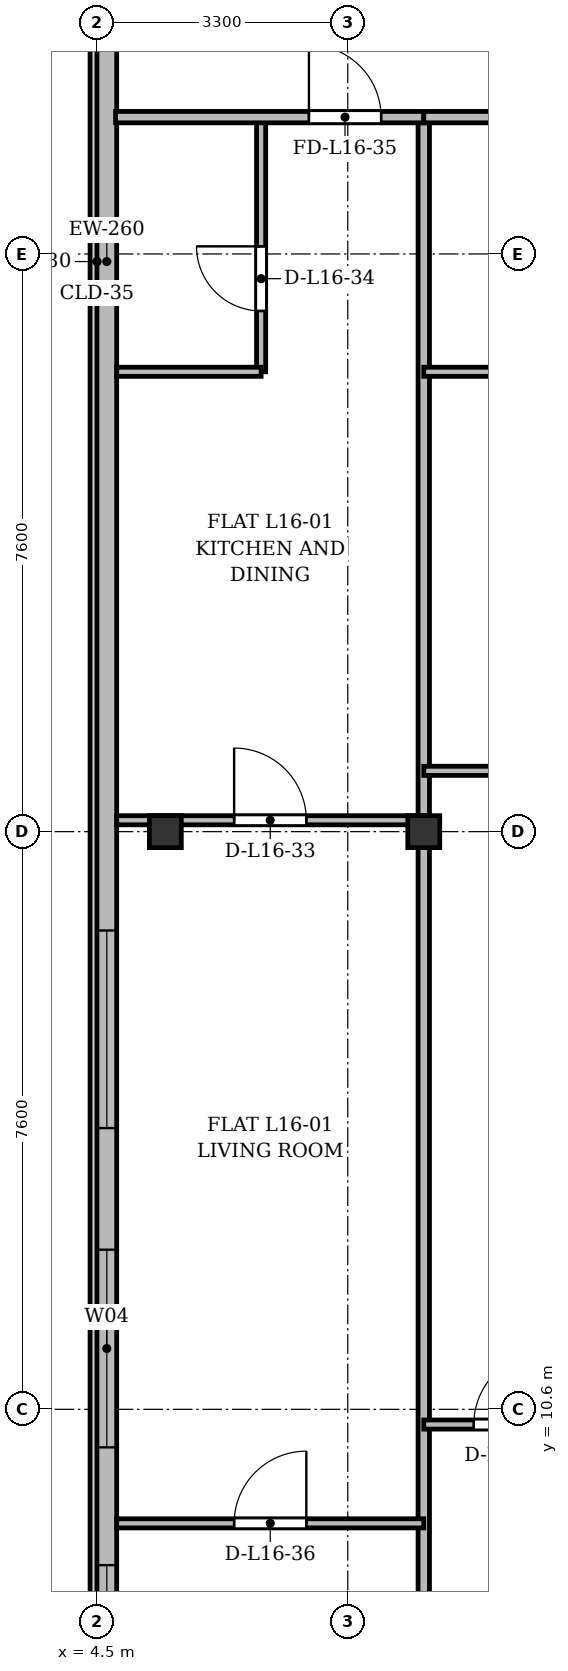
"""IFC4 building model, lengths in metres.
Left out: names, types, materials, properties, quantities, classifications, styles, units other than length and angle.
Written with IfcOpenShell. Run it as: python <this file> out.ifc"""

import sys

from ifc_helpers import new_model, si_unit, direction, frame, frame_2d, origin, origin_2d, place, context, subcontext, project, spatial, rectangle, i_section, extrude, source, transform, mapped, element, fill, save


model = new_model("IFC4")
c1 = context("Model", 3, precision=1e-05, world=origin(), true_north=direction((0.0, 1.0)))
c2 = subcontext(c1, "Body", "Model", "MODEL_VIEW")
j1 = project(units=[si_unit("LENGTHUNIT", "METRE"), si_unit("PLANEANGLEUNIT", "RADIAN")], contexts=[c1])
p1 = place(None, origin())
s1 = spatial("IfcSite", under=j1, at=p1, CompositionType="ELEMENT")
p2 = place(p1, origin())
s2 = spatial("IfcBuilding", under=s1, at=p2, CompositionType="ELEMENT")
p3 = place(p2, frame((0.0, 0.0, 63.1)))
s3 = spatial("IfcBuildingStorey", under=s2, at=p3, CompositionType="ELEMENT", Elevation=63.1)
m1 = source(origin(), c2, "Body", "SweptSolid", [
    extrude(i_section(OverallWidth=0.42, OverallDepth=0.42, WebThickness=0.026, FlangeThickness=0.04, at=origin_2d()), origin(), (0.0, 0.0, 1.0), 3.6),
])
for number, where, z_axis, x_axis in (
    (1, (5.4, 18.2, 0.0), (0.0, 0.0, 1.0), (1.0, 0.0, 0.0)),
    (2, (8.8, 18.2, 0.0), (0.0, 0.0, 1.0), (1.0, 0.0, 0.0)),
):
    element("IfcColumn", number, at=place(p3, frame(where, z_axis=z_axis, x_axis=x_axis)), inside=s3, PredefinedType="COLUMN", context=c2, shape_type="MappedRepresentation", body=[
        mapped(m1, transform((0.0, 0.0, 0.0), x_axis=(1.0, 0.0, 0.0), y_axis=(0.0, 1.0, 0.0), z_axis=(0.0, 0.0, 1.0), scale=1.0)),
    ])
p4 = place(p3, frame((4.63, 5.9, 0.0), z_axis=(0.0, 0.0, 1.0), x_axis=(0.0, 1.0, 0.0)))
e3 = element("IfcWall", 3, at=p4, inside=s3, PredefinedType="SOLIDWALL", context=c2, shape_type="SweptSolid", body=[
    extrude(rectangle(XDim=39.6, YDim=0.26, at=frame_2d((19.8, 0.0))), origin(), (0.0, 0.0, 1.0), 3.34),
])
p5 = place(p4, frame((1.45, 0.0, 0.92)))
e4 = element("IfcOpeningElement", 4, at=p5, cuts=e3, PredefinedType="OPENING", context=c2, shape_type="SweptSolid", body=[
    extrude(rectangle(XDim=1.2, YDim=1.65, at=frame_2d((0.6, 0.825))), frame((0.0, 0.14, 0.0), z_axis=(0.0, -1.0, 0.0), x_axis=(1.0, 0.0, 0.0)), (0.0, 0.0, 1.0), 0.28),
])
p6 = place(p4, frame((4.2, 0.0, 0.92)))
e5 = element("IfcOpeningElement", 5, at=p6, cuts=e3, PredefinedType="OPENING", context=c2, shape_type="SweptSolid", body=[
    extrude(rectangle(XDim=2.6, YDim=1.9, at=frame_2d((1.3, 0.95))), frame((0.0, 0.14, 0.0), z_axis=(0.0, -1.0, 0.0), x_axis=(1.0, 0.0, 0.0)), (0.0, 0.0, 1.0), 0.28),
])
p7 = place(p4, frame((8.4, 0.0, 0.92)))
e6 = element("IfcOpeningElement", 6, at=p7, cuts=e3, PredefinedType="OPENING", context=c2, shape_type="SweptSolid", body=[
    extrude(rectangle(XDim=2.6, YDim=1.9, at=frame_2d((1.3, 0.95))), frame((0.0, 0.14, 0.0), z_axis=(0.0, -1.0, 0.0), x_axis=(1.0, 0.0, 0.0)), (0.0, 0.0, 1.0), 0.28),
])
p8 = place(p4, frame((33.9, 0.0, 0.92)))
e7 = element("IfcOpeningElement", 7, at=p8, cuts=e3, PredefinedType="OPENING", context=c2, shape_type="SweptSolid", body=[
    extrude(rectangle(XDim=1.2, YDim=1.65, at=frame_2d((0.6, 0.825))), frame((0.0, 0.14, 0.0), z_axis=(0.0, -1.0, 0.0), x_axis=(1.0, 0.0, 0.0)), (0.0, 0.0, 1.0), 0.28),
])
p9 = place(p4, frame((37.25, 0.0, 0.92)))
e8 = element("IfcOpeningElement", 8, at=p9, cuts=e3, PredefinedType="OPENING", context=c2, shape_type="SweptSolid", body=[
    extrude(rectangle(XDim=1.2, YDim=1.65, at=frame_2d((0.6, 0.825))), frame((0.0, 0.14, 0.0), z_axis=(0.0, -1.0, 0.0), x_axis=(1.0, 0.0, 0.0)), (0.0, 0.0, 1.0), 0.28),
])
p10 = place(p3, frame((8.8, 3.145, 0.0), z_axis=(0.0, 0.0, 1.0), x_axis=(0.0, 1.0, 0.0)))
e9 = element("IfcWall", 9, at=p10, inside=s3, PredefinedType="PARTITIONING", context=c2, shape_type="SweptSolid", body=[
    extrude(rectangle(XDim=24.455, YDim=0.15, at=frame_2d((12.228, 0.0))), origin(), (0.0, 0.0, 1.0), 2.752),
])
p11 = place(p3, frame((4.76, 18.35, 0.0), z_axis=(0.0, 0.0, 1.0), x_axis=(1.0, 0.0, 0.0)))
e10 = element("IfcWall", 10, at=p11, inside=s3, PredefinedType="PARTITIONING", context=c2, shape_type="SweptSolid", body=[
    extrude(rectangle(XDim=4.04, YDim=0.12, at=frame_2d((2.02, 0.0))), origin(), (0.0, 0.0, 1.0), 2.69),
])
p12 = place(p11, frame((1.545, 0.0, 0.0)))
e11 = element("IfcOpeningElement", 11, at=p12, cuts=e10, PredefinedType="OPENING", context=c2, shape_type="SweptSolid", body=[
    extrude(rectangle(XDim=0.95, YDim=2.15, at=frame_2d((0.475, 1.075))), frame((0.0, 0.07, 0.0), z_axis=(0.0, -1.0, 0.0), x_axis=(1.0, 0.0, 0.0)), (0.0, 0.0, 1.0), 0.14),
])
p13 = place(p3, frame((6.66, 24.25, 0.0), z_axis=(0.0, 0.0, 1.0), x_axis=(0.0, 1.0, 0.0)))
e12 = element("IfcWall", 12, at=p13, inside=s3, PredefinedType="PARTITIONING", context=c2, shape_type="SweptSolid", body=[
    extrude(rectangle(XDim=3.35, YDim=0.12, at=frame_2d((1.675, 0.0))), origin(), (0.0, 0.0, 1.0), 2.94),
])
p14 = place(p13, frame((0.8, 0.0, 0.0)))
e13 = element("IfcOpeningElement", 13, at=p14, cuts=e12, PredefinedType="OPENING", context=c2, shape_type="SweptSolid", body=[
    extrude(rectangle(XDim=0.85, YDim=2.1, at=frame_2d((0.425, 1.05))), frame((0.0, 0.07, 0.0), z_axis=(0.0, -1.0, 0.0), x_axis=(1.0, 0.0, 0.0)), (0.0, 0.0, 1.0), 0.14),
])
p15 = place(p3, frame((4.76, 24.25, 0.0), z_axis=(0.0, 0.0, 1.0), x_axis=(1.0, 0.0, 0.0)))
e14 = element("IfcWall", 14, at=p15, inside=s3, PredefinedType="PARTITIONING", context=c2, shape_type="SweptSolid", body=[
    extrude(rectangle(XDim=1.9, YDim=0.12, at=frame_2d((0.95, 0.0))), origin(), (0.0, 0.0, 1.0), 2.752),
])
p16 = place(p3, frame((4.745, 27.6, 0.0), z_axis=(0.0, 0.0, 1.0), x_axis=(1.0, 0.0, 0.0)))
e15 = element("IfcWall", 15, at=p16, inside=s3, PredefinedType="PARTITIONING", context=c2, shape_type="SweptSolid", body=[
    extrude(rectangle(XDim=4.055, YDim=0.15, at=frame_2d((2.027, 0.0))), origin(), (0.0, 0.0, 1.0), 2.752),
])
p17 = place(p16, frame((2.544, 0.0, 0.0)))
e16 = element("IfcOpeningElement", 16, at=p17, cuts=e15, PredefinedType="OPENING", context=c2, shape_type="SweptSolid", body=[
    extrude(rectangle(XDim=0.95, YDim=2.15, at=frame_2d((0.475, 1.075))), frame((0.0, 0.085, 0.0), z_axis=(0.0, -1.0, 0.0), x_axis=(1.0, 0.0, 0.0)), (0.0, 0.0, 1.0), 0.17),
])
p18 = place(p3, frame((4.76, 9.1, 0.0), z_axis=(0.0, 0.0, 1.0), x_axis=(1.0, 0.0, 0.0)))
e17 = element("IfcWall", 17, at=p18, inside=s3, PredefinedType="PARTITIONING", context=c2, shape_type="SweptSolid", body=[
    extrude(rectangle(XDim=4.04, YDim=0.12, at=frame_2d((2.02, 0.0))), origin(), (0.0, 0.0, 1.0), 2.752),
])
p19 = place(p18, frame((1.545, 0.0, 0.0)))
e18 = element("IfcOpeningElement", 18, at=p19, cuts=e17, PredefinedType="OPENING", context=c2, shape_type="SweptSolid", body=[
    extrude(rectangle(XDim=0.95, YDim=2.15, at=frame_2d((0.475, 1.075))), frame((0.0, 0.07, 0.0), z_axis=(0.0, -1.0, 0.0), x_axis=(1.0, 0.0, 0.0)), (0.0, 0.0, 1.0), 0.14),
])
p20 = place(p3, frame((8.8, 19.0, 0.0), z_axis=(0.0, 0.0, 1.0), x_axis=(1.0, 0.0, 0.0)))
e19 = element("IfcWall", 19, at=p20, inside=s3, PredefinedType="PARTITIONING", context=c2, shape_type="SweptSolid", body=[
    extrude(rectangle(XDim=6.8, YDim=0.12, at=frame_2d((3.4, 0.0))), origin(), (0.0, 0.0, 1.0), 2.752),
])
p21 = place(p20, frame((2.925, 0.0, 0.0)))
e20 = element("IfcOpeningElement", 20, at=p21, cuts=e19, PredefinedType="OPENING", context=c2, shape_type="SweptSolid", body=[
    extrude(rectangle(XDim=0.95, YDim=2.15, at=frame_2d((0.475, 1.075))), frame((0.0, 0.07, 0.0), z_axis=(0.0, -1.0, 0.0), x_axis=(1.0, 0.0, 0.0)), (0.0, 0.0, 1.0), 0.14),
])
p22 = place(p3, frame((8.8, 24.25, 0.0), z_axis=(0.0, 0.0, 1.0), x_axis=(1.0, 0.0, 0.0)))
e21 = element("IfcWall", 21, at=p22, inside=s3, PredefinedType="PARTITIONING", context=c2, shape_type="SweptSolid", body=[
    extrude(rectangle(XDim=2.362, YDim=0.12, at=frame_2d((1.181, 0.0))), origin(), (0.0, 0.0, 1.0), 2.752),
])
p23 = place(p3, frame((8.8, 27.6, 0.0), z_axis=(0.0, 0.0, 1.0), x_axis=(1.0, 0.0, 0.0)))
e22 = element("IfcWall", 22, at=p23, inside=s3, PredefinedType="PARTITIONING", context=c2, shape_type="SweptSolid", body=[
    extrude(rectangle(XDim=6.8, YDim=0.15, at=frame_2d((3.4, 0.0))), origin(), (0.0, 0.0, 1.0), 2.752),
])
p24 = place(p23, frame((4.49, 0.0, 0.0)))
e23 = element("IfcOpeningElement", 23, at=p24, cuts=e22, PredefinedType="OPENING", context=c2, shape_type="SweptSolid", body=[
    extrude(rectangle(XDim=0.95, YDim=2.15, at=frame_2d((0.475, 1.075))), frame((0.0, 0.085, 0.0), z_axis=(0.0, -1.0, 0.0), x_axis=(1.0, 0.0, 0.0)), (0.0, 0.0, 1.0), 0.17),
])
p25 = place(p3, frame((8.8, 10.4, 0.0), z_axis=(0.0, 0.0, 1.0), x_axis=(1.0, 0.0, 0.0)))
e24 = element("IfcWall", 24, at=p25, inside=s3, PredefinedType="PARTITIONING", context=c2, shape_type="SweptSolid", body=[
    extrude(rectangle(XDim=2.267, YDim=0.12, at=frame_2d((1.133, 0.0))), origin(), (0.0, 0.0, 1.0), 2.752),
])
p26 = place(p25, frame((0.658, 0.0, 0.0)))
e25 = element("IfcOpeningElement", 25, at=p26, cuts=e24, PredefinedType="OPENING", context=c2, shape_type="SweptSolid", body=[
    extrude(rectangle(XDim=0.95, YDim=2.15, at=frame_2d((0.475, 1.075))), frame((0.0, 0.07, 0.0), z_axis=(0.0, -1.0, 0.0), x_axis=(1.0, 0.0, 0.0)), (0.0, 0.0, 1.0), 0.14),
])
m2 = source(origin(), c2, "Body", "SweptSolid", [
    extrude(rectangle(XDim=1.2, YDim=1.65, at=frame_2d((0.6, 0.825))), frame((0.0, 0.03, 0.0), z_axis=(0.0, -1.0, 0.0), x_axis=(1.0, 0.0, 0.0)), (0.0, 0.0, 1.0), 0.06),
])
p27 = place(p5, origin())
e26 = element("IfcWindow", 26, at=p27, inside=s3, PartitioningType="SINGLE_PANEL", PredefinedType="WINDOW", context=c2, shape_type="MappedRepresentation", body=[
    mapped(m2, transform((0.0, 0.0, 0.0), x_axis=(1.0, 0.0, 0.0), y_axis=(0.0, 1.0, 0.0), z_axis=(0.0, 0.0, 1.0), scale=1.0)),
])
fill(e4, e26)
m3 = source(origin(), c2, "Body", "SweptSolid", [
    extrude(rectangle(XDim=2.6, YDim=1.9, at=frame_2d((1.3, 0.95))), frame((0.0, 0.03, 0.0), z_axis=(0.0, -1.0, 0.0), x_axis=(1.0, 0.0, 0.0)), (0.0, 0.0, 1.0), 0.06),
])
p28 = place(p6, origin())
e27 = element("IfcWindow", 27, at=p28, inside=s3, PartitioningType="SINGLE_PANEL", PredefinedType="WINDOW", context=c2, shape_type="MappedRepresentation", body=[
    mapped(m3, transform((0.0, 0.0, 0.0), x_axis=(1.0, 0.0, 0.0), y_axis=(0.0, 1.0, 0.0), z_axis=(0.0, 0.0, 1.0), scale=1.0)),
])
fill(e5, e27)
p29 = place(p7, origin())
e28 = element("IfcWindow", 28, at=p29, inside=s3, PartitioningType="SINGLE_PANEL", PredefinedType="WINDOW", context=c2, shape_type="MappedRepresentation", body=[
    mapped(m3, transform((0.0, 0.0, 0.0), x_axis=(1.0, 0.0, 0.0), y_axis=(0.0, 1.0, 0.0), z_axis=(0.0, 0.0, 1.0), scale=1.0)),
])
fill(e6, e28)
m4 = source(origin(), c2, "Body", "SweptSolid", [
    extrude(rectangle(XDim=0.95, YDim=2.15, at=frame_2d((0.475, 1.075))), frame((0.0, 0.025, 0.0), z_axis=(0.0, -1.0, 0.0), x_axis=(1.0, 0.0, 0.0)), (0.0, 0.0, 1.0), 0.05),
])
p30 = place(p12, origin())
e29 = element("IfcDoor", 29, at=p30, inside=s3, OperationType="SINGLE_SWING_LEFT", PredefinedType="DOOR", context=c2, shape_type="MappedRepresentation", body=[
    mapped(m4, transform((0.0, 0.0, 0.0), x_axis=(1.0, 0.0, 0.0), y_axis=(0.0, 1.0, 0.0), z_axis=(0.0, 0.0, 1.0), scale=1.0)),
])
fill(e11, e29)
m5 = source(origin(), c2, "Body", "SweptSolid", [
    extrude(rectangle(XDim=0.85, YDim=2.1, at=frame_2d((0.425, 1.05))), frame((0.0, 0.025, 0.0), z_axis=(0.0, -1.0, 0.0), x_axis=(1.0, 0.0, 0.0)), (0.0, 0.0, 1.0), 0.05),
])
p31 = place(p14, origin())
e30 = element("IfcDoor", 30, at=p31, inside=s3, OperationType="SINGLE_SWING_RIGHT", PredefinedType="DOOR", context=c2, shape_type="MappedRepresentation", body=[
    mapped(m5, transform((0.0, 0.0, 0.0), x_axis=(1.0, 0.0, 0.0), y_axis=(0.0, 1.0, 0.0), z_axis=(0.0, 0.0, 1.0), scale=1.0)),
])
fill(e13, e30)
p32 = place(p17, origin())
e31 = element("IfcDoor", 31, at=p32, inside=s3, OperationType="SINGLE_SWING_LEFT", PredefinedType="DOOR", context=c2, shape_type="MappedRepresentation", body=[
    mapped(m4, transform((0.0, 0.0, 0.0), x_axis=(1.0, 0.0, 0.0), y_axis=(0.0, 1.0, 0.0), z_axis=(0.0, 0.0, 1.0), scale=1.0)),
])
fill(e16, e31)
p33 = place(p19, origin())
e32 = element("IfcDoor", 32, at=p33, inside=s3, OperationType="SINGLE_SWING_RIGHT", PredefinedType="DOOR", context=c2, shape_type="MappedRepresentation", body=[
    mapped(m4, transform((0.0, 0.0, 0.0), x_axis=(1.0, 0.0, 0.0), y_axis=(0.0, 1.0, 0.0), z_axis=(0.0, 0.0, 1.0), scale=1.0)),
])
fill(e18, e32)
p34 = place(p26, origin())
e33 = element("IfcDoor", 33, at=p34, inside=s3, OperationType="SINGLE_SWING_RIGHT", PredefinedType="DOOR", context=c2, shape_type="MappedRepresentation", body=[
    mapped(m4, transform((0.0, 0.0, 0.0), x_axis=(1.0, 0.0, 0.0), y_axis=(0.0, 1.0, 0.0), z_axis=(0.0, 0.0, 1.0), scale=1.0)),
])
fill(e25, e33)
save(model, sys.argv[1])
